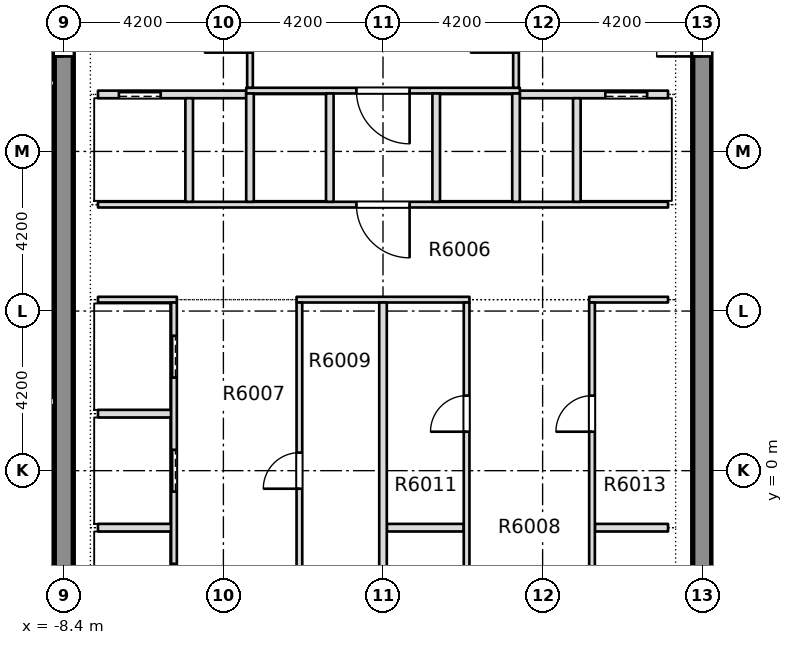
"""IFC4 building model, lengths in metres.
Left out: names, types, materials, properties, quantities, classifications, styles, units other than length and angle.
Written with IfcOpenShell. Run it as: python <this file> out.ifc"""

import sys

from ifc_helpers import new_model, si_unit, direction, frame, frame_2d, origin, place, context, subcontext, project, spatial, rectangle, extrude, element, fill, save


model = new_model("IFC4")
c1 = context("Model", 3, precision=1e-05, world=origin(), true_north=direction((0.0, 1.0)))
c2 = subcontext(c1, "Body", "Model", "MODEL_VIEW")
j1 = project(units=[si_unit("LENGTHUNIT", "METRE"), si_unit("PLANEANGLEUNIT", "RADIAN")], contexts=[c1])
p1 = place(None, origin())
s1 = spatial("IfcSite", under=j1, at=p1, CompositionType="ELEMENT")
p2 = place(p1, origin())
s2 = spatial("IfcBuilding", under=s1, at=p2, CompositionType="ELEMENT")
p3 = place(p2, frame((0.0, 0.0, 230.35)))
s3 = spatial("IfcBuildingStorey", under=s2, at=p3, CompositionType="ELEMENT", Elevation=230.35)
p4 = place(p3, frame((-8.4, -7.9, -0.4), z_axis=(0.0, 0.0, 1.0), x_axis=(0.0, 1.0, 0.0)))
e1 = element("IfcWall", 1, at=p4, inside=s3, PredefinedType="SHEAR", context=c2, shape_type="SweptSolid", body=[
    extrude(rectangle(XDim=29.15, YDim=0.5, at=frame_2d((14.575, 0.0))), origin(), (0.0, 0.0, 1.0), 3.45),
])
p5 = place(p4, frame((18.8, 0.0, 0.4)))
e2 = element("IfcOpeningElement", 2, at=p5, cuts=e1, PredefinedType="OPENING", context=c2, shape_type="SweptSolid", body=[
    extrude(rectangle(XDim=1.2, YDim=2.1, at=frame_2d((0.6, 1.05))), frame((0.0, 0.26, 0.0), z_axis=(0.0, -1.0, 0.0), x_axis=(1.0, 0.0, 0.0)), (0.0, 0.0, 1.0), 0.52),
])
p6 = place(p3, frame((8.4, -7.9, -0.4), z_axis=(0.0, 0.0, 1.0), x_axis=(0.0, 1.0, 0.0)))
e3 = element("IfcWall", 3, at=p6, inside=s3, PredefinedType="SHEAR", context=c2, shape_type="SweptSolid", body=[
    extrude(rectangle(XDim=29.15, YDim=0.5, at=frame_2d((14.575, 0.0))), origin(), (0.0, 0.0, 1.0), 3.45),
])
p7 = place(p6, frame((18.8, 0.0, 0.4)))
e4 = element("IfcOpeningElement", 4, at=p7, cuts=e3, PredefinedType="OPENING", context=c2, shape_type="SweptSolid", body=[
    extrude(rectangle(XDim=1.2, YDim=2.1, at=frame_2d((0.6, 1.05))), frame((0.0, 0.26, 0.0), z_axis=(0.0, -1.0, 0.0), x_axis=(1.0, 0.0, 0.0)), (0.0, 0.0, 1.0), 0.52),
])
p8 = place(p3, frame((-7.5, -1.5, 0.0), z_axis=(0.0, 0.0, 1.0), x_axis=(1.0, 0.0, 0.0)))
e5 = element("IfcWall", 5, at=p8, inside=s3, PredefinedType="PARTITIONING", context=c2, shape_type="SweptSolid", body=[
    extrude(rectangle(XDim=1.925, YDim=0.2, at=frame_2d((0.962, 0.0))), origin(), (0.0, 0.0, 1.0), 3.05),
])
p9 = place(p3, frame((0.1, -1.5, 0.0), z_axis=(0.0, 0.0, 1.0), x_axis=(1.0, 0.0, 0.0)))
e6 = element("IfcWall", 6, at=p9, inside=s3, PredefinedType="PARTITIONING", context=c2, shape_type="SweptSolid", body=[
    extrude(rectangle(XDim=2.025, YDim=0.2, at=frame_2d((1.012, 0.0))), origin(), (0.0, 0.0, 1.0), 3.05),
])
for number, where, z_axis, x_axis in (
    (7, (5.575, -1.5, 0.0), (0.0, 0.0, 1.0), (1.0, 0.0, 0.0)),
    (8, (-7.5, 1.5, 0.0), (0.0, 0.0, 1.0), (1.0, 0.0, 0.0)),
):
    element("IfcWall", number, at=place(p3, frame(where, z_axis=z_axis, x_axis=x_axis)), inside=s3, PredefinedType="PARTITIONING", context=c2, shape_type="SweptSolid", body=[
        extrude(rectangle(XDim=1.925, YDim=0.2, at=frame_2d((0.962, 0.0))), origin(), (0.0, 0.0, 1.0), 3.05),
    ])
p10 = place(p3, frame((-7.5, 4.5, 0.0), z_axis=(0.0, 0.0, 1.0), x_axis=(1.0, 0.0, 0.0)))
e9 = element("IfcWall", 9, at=p10, inside=s3, PredefinedType="PARTITIONING", context=c2, shape_type="SweptSolid", body=[
    extrude(rectangle(XDim=2.075, YDim=0.15, at=frame_2d((1.038, 0.0))), origin(), (0.0, 0.0, 1.0), 3.05),
])
p11 = place(p3, frame((-2.275, 4.5, 0.0), z_axis=(0.0, 0.0, 1.0), x_axis=(1.0, 0.0, 0.0)))
e10 = element("IfcWall", 10, at=p11, inside=s3, PredefinedType="PARTITIONING", context=c2, shape_type="SweptSolid", body=[
    extrude(rectangle(XDim=4.55, YDim=0.15, at=frame_2d((2.275, 0.0))), origin(), (0.0, 0.0, 1.0), 3.05),
])
p12 = place(p3, frame((5.425, 4.5, 0.0), z_axis=(0.0, 0.0, 1.0), x_axis=(1.0, 0.0, 0.0)))
e11 = element("IfcWall", 11, at=p12, inside=s3, PredefinedType="PARTITIONING", context=c2, shape_type="SweptSolid", body=[
    extrude(rectangle(XDim=2.075, YDim=0.15, at=frame_2d((1.038, 0.0))), origin(), (0.0, 0.0, 1.0), 3.05),
])
p13 = place(p3, frame((-7.5, 7.0, 0.0), z_axis=(0.0, 0.0, 1.0), x_axis=(1.0, 0.0, 0.0)))
e12 = element("IfcWall", 12, at=p13, inside=s3, PredefinedType="PARTITIONING", context=c2, shape_type="SweptSolid", body=[
    extrude(rectangle(XDim=15.0, YDim=0.15, at=frame_2d((7.5, 0.0))), origin(), (0.0, 0.0, 1.0), 3.05),
])
p14 = place(p13, frame((6.8, 0.0, 0.0)))
e13 = element("IfcOpeningElement", 13, at=p14, cuts=e12, PredefinedType="OPENING", context=c2, shape_type="SweptSolid", body=[
    extrude(rectangle(XDim=1.4, YDim=2.1, at=frame_2d((0.7, 1.05))), frame((0.0, 0.085, 0.0), z_axis=(0.0, -1.0, 0.0), x_axis=(1.0, 0.0, 0.0)), (0.0, 0.0, 1.0), 0.17),
])
p15 = place(p3, frame((-7.5, 9.9, 0.0), z_axis=(0.0, 0.0, 1.0), x_axis=(1.0, 0.0, 0.0)))
e14 = element("IfcWall", 14, at=p15, inside=s3, PredefinedType="PARTITIONING", context=c2, shape_type="SweptSolid", body=[
    extrude(rectangle(XDim=3.9, YDim=0.2, at=frame_2d((1.95, 0.0))), origin(), (0.0, 0.0, 1.0), 3.05),
])
p16 = place(p15, frame((0.55, 0.0, 0.0)))
e15 = element("IfcOpeningElement", 15, at=p16, cuts=e14, PredefinedType="OPENING", context=c2, shape_type="SweptSolid", body=[
    extrude(rectangle(XDim=1.1, YDim=2.1, at=frame_2d((0.55, 1.05))), frame((0.0, 0.11, 0.0), z_axis=(0.0, -1.0, 0.0), x_axis=(1.0, 0.0, 0.0)), (0.0, 0.0, 1.0), 0.22),
])
p17 = place(p3, frame((3.6, 9.9, 0.0), z_axis=(0.0, 0.0, 1.0), x_axis=(1.0, 0.0, 0.0)))
e16 = element("IfcWall", 16, at=p17, inside=s3, PredefinedType="PARTITIONING", context=c2, shape_type="SweptSolid", body=[
    extrude(rectangle(XDim=3.9, YDim=0.2, at=frame_2d((1.95, 0.0))), origin(), (0.0, 0.0, 1.0), 3.05),
])
p18 = place(p17, frame((2.25, 0.0, 0.0)))
e17 = element("IfcOpeningElement", 17, at=p18, cuts=e16, PredefinedType="OPENING", context=c2, shape_type="SweptSolid", body=[
    extrude(rectangle(XDim=1.1, YDim=2.1, at=frame_2d((0.55, 1.05))), frame((0.0, 0.11, 0.0), z_axis=(0.0, -1.0, 0.0), x_axis=(1.0, 0.0, 0.0)), (0.0, 0.0, 1.0), 0.22),
])
p19 = place(p3, frame((-3.6, 10.0, 0.0), z_axis=(0.0, 0.0, 1.0), x_axis=(1.0, 0.0, 0.0)))
e18 = element("IfcWall", 18, at=p19, inside=s3, PredefinedType="PARTITIONING", context=c2, shape_type="SweptSolid", body=[
    extrude(rectangle(XDim=7.2, YDim=0.15, at=frame_2d((3.6, 0.0))), origin(), (0.0, 0.0, 1.0), 3.05),
])
p20 = place(p19, frame((2.9, 0.0, 0.0)))
e19 = element("IfcOpeningElement", 19, at=p20, cuts=e18, PredefinedType="OPENING", context=c2, shape_type="SweptSolid", body=[
    extrude(rectangle(XDim=1.4, YDim=2.1, at=frame_2d((0.7, 1.05))), frame((0.0, 0.085, 0.0), z_axis=(0.0, -1.0, 0.0), x_axis=(1.0, 0.0, 0.0)), (0.0, 0.0, 1.0), 0.17),
])
p21 = place(p3, frame((-5.5, -7.899, 0.0), z_axis=(0.0, 0.0, 1.0), x_axis=(0.0, 1.0, 0.0)))
e20 = element("IfcWall", 20, at=p21, inside=s3, PredefinedType="PARTITIONING", context=c2, shape_type="SweptSolid", body=[
    extrude(rectangle(XDim=12.324, YDim=0.15, at=frame_2d((6.162, 0.0))), origin(), (0.0, 0.0, 1.0), 3.05),
])
p22 = place(p21, frame((1.349, 0.0, 0.0)))
e21 = element("IfcOpeningElement", 21, at=p22, cuts=e20, PredefinedType="OPENING", context=c2, shape_type="SweptSolid", body=[
    extrude(rectangle(XDim=1.1, YDim=2.1, at=frame_2d((0.55, 1.05))), frame((0.0, 0.085, 0.0), z_axis=(0.0, -1.0, 0.0), x_axis=(1.0, 0.0, 0.0)), (0.0, 0.0, 1.0), 0.17),
])
p23 = place(p21, frame((4.349, 0.0, 0.0)))
e22 = element("IfcOpeningElement", 22, at=p23, cuts=e20, PredefinedType="OPENING", context=c2, shape_type="SweptSolid", body=[
    extrude(rectangle(XDim=1.1, YDim=2.1, at=frame_2d((0.55, 1.05))), frame((0.0, 0.085, 0.0), z_axis=(0.0, -1.0, 0.0), x_axis=(1.0, 0.0, 0.0)), (0.0, 0.0, 1.0), 0.17),
])
p24 = place(p21, frame((7.349, 0.0, 0.0)))
e23 = element("IfcOpeningElement", 23, at=p24, cuts=e20, PredefinedType="OPENING", context=c2, shape_type="SweptSolid", body=[
    extrude(rectangle(XDim=1.1, YDim=2.1, at=frame_2d((0.55, 1.05))), frame((0.0, 0.085, 0.0), z_axis=(0.0, -1.0, 0.0), x_axis=(1.0, 0.0, 0.0)), (0.0, 0.0, 1.0), 0.17),
])
p25 = place(p21, frame((10.349, 0.0, 0.0)))
e24 = element("IfcOpeningElement", 24, at=p25, cuts=e20, PredefinedType="OPENING", context=c2, shape_type="SweptSolid", body=[
    extrude(rectangle(XDim=1.1, YDim=2.1, at=frame_2d((0.55, 1.05))), frame((0.0, 0.085, 0.0), z_axis=(0.0, -1.0, 0.0), x_axis=(1.0, 0.0, 0.0)), (0.0, 0.0, 1.0), 0.17),
])
p26 = place(p3, frame((-5.1, 7.075, 0.0), z_axis=(0.0, 0.0, 1.0), x_axis=(0.0, 1.0, 0.0)))
e25 = element("IfcWall", 25, at=p26, inside=s3, PredefinedType="PARTITIONING", context=c2, shape_type="SweptSolid", body=[
    extrude(rectangle(XDim=2.725, YDim=0.2, at=frame_2d((1.363, 0.0))), origin(), (0.0, 0.0, 1.0), 3.05),
])
p27 = place(p3, frame((-3.5, 7.075, 0.0), z_axis=(0.0, 0.0, 1.0), x_axis=(0.0, 1.0, 0.0)))
e26 = element("IfcWall", 26, at=p27, inside=s3, PredefinedType="PARTITIONING", context=c2, shape_type="SweptSolid", body=[
    extrude(rectangle(XDim=2.85, YDim=0.2, at=frame_2d((1.425, 0.0))), origin(), (0.0, 0.0, 1.0), 3.05),
])
p28 = place(p3, frame((-3.5, 10.075, 0.0), z_axis=(0.0, 0.0, 1.0), x_axis=(0.0, 1.0, 0.0)))
e27 = element("IfcWall", 27, at=p28, inside=s3, PredefinedType="PARTITIONING", context=c2, shape_type="SweptSolid", body=[
    extrude(rectangle(XDim=3.075, YDim=0.15, at=frame_2d((1.538, 0.0))), origin(), (0.0, 0.0, 1.0), 3.05),
])
p29 = place(p28, frame((0.925, 0.0, 0.0)))
e28 = element("IfcOpeningElement", 28, at=p29, cuts=e27, PredefinedType="OPENING", context=c2, shape_type="SweptSolid", body=[
    extrude(rectangle(XDim=1.2, YDim=2.1, at=frame_2d((0.6, 1.05))), frame((0.0, 0.085, 0.0), z_axis=(0.0, -1.0, 0.0), x_axis=(1.0, 0.0, 0.0)), (0.0, 0.0, 1.0), 0.17),
])
p30 = place(p3, frame((-2.2, -7.899, 0.0), z_axis=(0.0, 0.0, 1.0), x_axis=(0.0, 1.0, 0.0)))
e29 = element("IfcWall", 29, at=p30, inside=s3, PredefinedType="PARTITIONING", context=c2, shape_type="SweptSolid", body=[
    extrude(rectangle(XDim=12.324, YDim=0.15, at=frame_2d((6.162, 0.0))), origin(), (0.0, 0.0, 1.0), 3.05),
])
p31 = place(p30, frame((1.349, 0.0, 0.0)))
e30 = element("IfcOpeningElement", 30, at=p31, cuts=e29, PredefinedType="OPENING", context=c2, shape_type="SweptSolid", body=[
    extrude(rectangle(XDim=1.1, YDim=2.1, at=frame_2d((0.55, 1.05))), frame((0.0, 0.085, 0.0), z_axis=(0.0, -1.0, 0.0), x_axis=(1.0, 0.0, 0.0)), (0.0, 0.0, 1.0), 0.17),
])
p32 = place(p30, frame((7.424, 0.0, 0.0)))
e31 = element("IfcOpeningElement", 31, at=p32, cuts=e29, PredefinedType="OPENING", context=c2, shape_type="SweptSolid", body=[
    extrude(rectangle(XDim=0.95, YDim=2.1, at=frame_2d((0.475, 1.05))), frame((0.0, 0.085, 0.0), z_axis=(0.0, -1.0, 0.0), x_axis=(1.0, 0.0, 0.0)), (0.0, 0.0, 1.0), 0.17),
])
p33 = place(p3, frame((-1.4, 7.075, 0.0), z_axis=(0.0, 0.0, 1.0), x_axis=(0.0, 1.0, 0.0)))
e32 = element("IfcWall", 32, at=p33, inside=s3, PredefinedType="PARTITIONING", context=c2, shape_type="SweptSolid", body=[
    extrude(rectangle(XDim=2.85, YDim=0.2, at=frame_2d((1.425, 0.0))), origin(), (0.0, 0.0, 1.0), 3.05),
])
p34 = place(p3, frame((0.0, -7.899, 0.0), z_axis=(0.0, 0.0, 1.0), x_axis=(0.0, 1.0, 0.0)))
e33 = element("IfcWall", 33, at=p34, inside=s3, PredefinedType="PARTITIONING", context=c2, shape_type="SweptSolid", body=[
    extrude(rectangle(XDim=12.324, YDim=0.2, at=frame_2d((6.162, 0.0))), origin(), (0.0, 0.0, 1.0), 3.05),
])
p35 = place(p3, frame((1.4, 7.075, 0.0), z_axis=(0.0, 0.0, 1.0), x_axis=(0.0, 1.0, 0.0)))
e34 = element("IfcWall", 34, at=p35, inside=s3, PredefinedType="PARTITIONING", context=c2, shape_type="SweptSolid", body=[
    extrude(rectangle(XDim=2.85, YDim=0.2, at=frame_2d((1.425, 0.0))), origin(), (0.0, 0.0, 1.0), 3.05),
])
p36 = place(p3, frame((2.2, -7.899, 0.0), z_axis=(0.0, 0.0, 1.0), x_axis=(0.0, 1.0, 0.0)))
e35 = element("IfcWall", 35, at=p36, inside=s3, PredefinedType="PARTITIONING", context=c2, shape_type="SweptSolid", body=[
    extrude(rectangle(XDim=12.324, YDim=0.15, at=frame_2d((6.162, 0.0))), origin(), (0.0, 0.0, 1.0), 3.05),
])
p37 = place(p36, frame((2.924, 0.0, 0.0)))
e36 = element("IfcOpeningElement", 36, at=p37, cuts=e35, PredefinedType="OPENING", context=c2, shape_type="SweptSolid", body=[
    extrude(rectangle(XDim=0.95, YDim=2.1, at=frame_2d((0.475, 1.05))), frame((0.0, 0.085, 0.0), z_axis=(0.0, -1.0, 0.0), x_axis=(1.0, 0.0, 0.0)), (0.0, 0.0, 1.0), 0.17),
])
p38 = place(p36, frame((8.924, 0.0, 0.0)))
e37 = element("IfcOpeningElement", 37, at=p38, cuts=e35, PredefinedType="OPENING", context=c2, shape_type="SweptSolid", body=[
    extrude(rectangle(XDim=0.95, YDim=2.1, at=frame_2d((0.475, 1.05))), frame((0.0, 0.085, 0.0), z_axis=(0.0, -1.0, 0.0), x_axis=(1.0, 0.0, 0.0)), (0.0, 0.0, 1.0), 0.17),
])
p39 = place(p3, frame((3.5, 7.075, 0.0), z_axis=(0.0, 0.0, 1.0), x_axis=(0.0, 1.0, 0.0)))
e38 = element("IfcWall", 38, at=p39, inside=s3, PredefinedType="PARTITIONING", context=c2, shape_type="SweptSolid", body=[
    extrude(rectangle(XDim=2.85, YDim=0.2, at=frame_2d((1.425, 0.0))), origin(), (0.0, 0.0, 1.0), 3.05),
])
p40 = place(p3, frame((3.5, 10.075, 0.0), z_axis=(0.0, 0.0, 1.0), x_axis=(0.0, 1.0, 0.0)))
e39 = element("IfcWall", 39, at=p40, inside=s3, PredefinedType="PARTITIONING", context=c2, shape_type="SweptSolid", body=[
    extrude(rectangle(XDim=3.075, YDim=0.15, at=frame_2d((1.538, 0.0))), origin(), (0.0, 0.0, 1.0), 3.05),
])
p41 = place(p40, frame((0.925, 0.0, 0.0)))
e40 = element("IfcOpeningElement", 40, at=p41, cuts=e39, PredefinedType="OPENING", context=c2, shape_type="SweptSolid", body=[
    extrude(rectangle(XDim=1.2, YDim=2.1, at=frame_2d((0.6, 1.05))), frame((0.0, 0.085, 0.0), z_axis=(0.0, -1.0, 0.0), x_axis=(1.0, 0.0, 0.0)), (0.0, 0.0, 1.0), 0.17),
])
p42 = place(p3, frame((5.1, 7.075, 0.0), z_axis=(0.0, 0.0, 1.0), x_axis=(0.0, 1.0, 0.0)))
e41 = element("IfcWall", 41, at=p42, inside=s3, PredefinedType="PARTITIONING", context=c2, shape_type="SweptSolid", body=[
    extrude(rectangle(XDim=2.725, YDim=0.2, at=frame_2d((1.363, 0.0))), origin(), (0.0, 0.0, 1.0), 3.05),
])
p43 = place(p3, frame((5.5, -7.899, 0.0), z_axis=(0.0, 0.0, 1.0), x_axis=(0.0, 1.0, 0.0)))
e42 = element("IfcWall", 42, at=p43, inside=s3, PredefinedType="PARTITIONING", context=c2, shape_type="SweptSolid", body=[
    extrude(rectangle(XDim=12.324, YDim=0.15, at=frame_2d((6.162, 0.0))), origin(), (0.0, 0.0, 1.0), 3.05),
])
p44 = place(p43, frame((2.924, 0.0, 0.0)))
e43 = element("IfcOpeningElement", 43, at=p44, cuts=e42, PredefinedType="OPENING", context=c2, shape_type="SweptSolid", body=[
    extrude(rectangle(XDim=0.95, YDim=2.1, at=frame_2d((0.475, 1.05))), frame((0.0, 0.085, 0.0), z_axis=(0.0, -1.0, 0.0), x_axis=(1.0, 0.0, 0.0)), (0.0, 0.0, 1.0), 0.17),
])
p45 = place(p43, frame((8.924, 0.0, 0.0)))
e44 = element("IfcOpeningElement", 44, at=p45, cuts=e42, PredefinedType="OPENING", context=c2, shape_type="SweptSolid", body=[
    extrude(rectangle(XDim=0.95, YDim=2.1, at=frame_2d((0.475, 1.05))), frame((0.0, 0.085, 0.0), z_axis=(0.0, -1.0, 0.0), x_axis=(1.0, 0.0, 0.0)), (0.0, 0.0, 1.0), 0.17),
])
p46 = place(p3, frame((-12.099, 1.816, 0.0), z_axis=(0.0, 0.0, 1.0), x_axis=(1.0, 0.0, 0.0)))
e45 = element("IfcWall", 45, at=p46, inside=s3, PredefinedType="PARTITIONING", context=c2, shape_type="SweptSolid", body=[
    extrude(rectangle(XDim=3.448, YDim=0.2, at=frame_2d((1.724, 0.0))), origin(), (0.0, 0.0, 1.0), 3.05),
])
p47 = place(p3, frame((-12.099, 10.2, 0.0), z_axis=(0.0, 0.0, 1.0), x_axis=(1.0, 0.0, 0.0)))
e46 = element("IfcWall", 46, at=p47, inside=s3, PredefinedType="PARTITIONING", context=c2, shape_type="SweptSolid", body=[
    extrude(rectangle(XDim=3.448, YDim=0.15, at=frame_2d((1.724, 0.0))), origin(), (0.0, 0.0, 1.0), 3.05),
])
for number, where, z_axis, x_axis in (
    (47, (8.651, -0.125, 0.0), (0.0, 0.0, 1.0), (1.0, 0.0, 0.0)),
    (48, (8.651, 4.054, 0.0), (0.0, 0.0, 1.0), (1.0, 0.0, 0.0)),
):
    element("IfcWall", number, at=place(p3, frame(where, z_axis=z_axis, x_axis=x_axis)), inside=s3, PredefinedType="PARTITIONING", context=c2, shape_type="SweptSolid", body=[
        extrude(rectangle(XDim=3.448, YDim=0.1, at=frame_2d((1.724, 0.0))), origin(), (0.0, 0.0, 1.0), 3.05),
    ])
p48 = place(p3, frame((8.651, 10.2, 0.0), z_axis=(0.0, 0.0, 1.0), x_axis=(1.0, 0.0, 0.0)))
e49 = element("IfcWall", 49, at=p48, inside=s3, PredefinedType="PARTITIONING", context=c2, shape_type="SweptSolid", body=[
    extrude(rectangle(XDim=3.448, YDim=0.15, at=frame_2d((1.724, 0.0))), origin(), (0.0, 0.0, 1.0), 3.05),
])
p49 = place(p23, origin())
e50 = element("IfcDoor", 50, at=p49, inside=s3, OperationType="SLIDING_TO_LEFT", PredefinedType="DOOR", context=c2, shape_type="SweptSolid", body=[
    extrude(rectangle(XDim=1.1, YDim=2.1, at=frame_2d((0.55, 1.05))), frame((0.0, 0.025, 0.0), z_axis=(0.0, -1.0, 0.0), x_axis=(1.0, 0.0, 0.0)), (0.0, 0.0, 1.0), 0.05),
])
fill(e22, e50)
p50 = place(p24, origin())
e51 = element("IfcDoor", 51, at=p50, inside=s3, OperationType="SLIDING_TO_LEFT", PredefinedType="DOOR", context=c2, shape_type="SweptSolid", body=[
    extrude(rectangle(XDim=1.1, YDim=2.1, at=frame_2d((0.55, 1.05))), frame((0.0, 0.025, 0.0), z_axis=(0.0, -1.0, 0.0), x_axis=(1.0, 0.0, 0.0)), (0.0, 0.0, 1.0), 0.05),
])
fill(e23, e51)
p51 = place(p25, origin())
e52 = element("IfcDoor", 52, at=p51, inside=s3, OperationType="SLIDING_TO_LEFT", PredefinedType="DOOR", context=c2, shape_type="SweptSolid", body=[
    extrude(rectangle(XDim=1.1, YDim=2.1, at=frame_2d((0.55, 1.05))), frame((0.0, 0.025, 0.0), z_axis=(0.0, -1.0, 0.0), x_axis=(1.0, 0.0, 0.0)), (0.0, 0.0, 1.0), 0.05),
])
fill(e24, e52)
p52 = place(p32, origin())
e53 = element("IfcDoor", 53, at=p52, inside=s3, OperationType="SINGLE_SWING_RIGHT", PredefinedType="DOOR", context=c2, shape_type="SweptSolid", body=[
    extrude(rectangle(XDim=0.95, YDim=2.1, at=frame_2d((0.475, 1.05))), frame((0.0, 0.025, 0.0), z_axis=(0.0, -1.0, 0.0), x_axis=(1.0, 0.0, 0.0)), (0.0, 0.0, 1.0), 0.05),
])
fill(e31, e53)
p53 = place(p38, origin())
e54 = element("IfcDoor", 54, at=p53, inside=s3, OperationType="SINGLE_SWING_RIGHT", PredefinedType="DOOR", context=c2, shape_type="SweptSolid", body=[
    extrude(rectangle(XDim=0.95, YDim=2.1, at=frame_2d((0.475, 1.05))), frame((0.0, 0.025, 0.0), z_axis=(0.0, -1.0, 0.0), x_axis=(1.0, 0.0, 0.0)), (0.0, 0.0, 1.0), 0.05),
])
fill(e37, e54)
p54 = place(p45, origin())
e55 = element("IfcDoor", 55, at=p54, inside=s3, OperationType="SINGLE_SWING_LEFT", PredefinedType="DOOR", context=c2, shape_type="SweptSolid", body=[
    extrude(rectangle(XDim=0.95, YDim=2.1, at=frame_2d((0.475, 1.05))), frame((0.0, 0.025, 0.0), z_axis=(0.0, -1.0, 0.0), x_axis=(1.0, 0.0, 0.0)), (0.0, 0.0, 1.0), 0.05),
])
fill(e44, e55)
p55 = place(p16, origin())
e56 = element("IfcDoor", 56, at=p55, inside=s3, OperationType="SLIDING_TO_RIGHT", PredefinedType="DOOR", context=c2, shape_type="SweptSolid", body=[
    extrude(rectangle(XDim=1.1, YDim=2.1, at=frame_2d((0.55, 1.05))), frame((0.0, 0.025, 0.0), z_axis=(0.0, -1.0, 0.0), x_axis=(1.0, 0.0, 0.0)), (0.0, 0.0, 1.0), 0.05),
])
fill(e15, e56)
p56 = place(p18, origin())
e57 = element("IfcDoor", 57, at=p56, inside=s3, OperationType="SLIDING_TO_LEFT", PredefinedType="DOOR", context=c2, shape_type="SweptSolid", body=[
    extrude(rectangle(XDim=1.1, YDim=2.1, at=frame_2d((0.55, 1.05))), frame((0.0, 0.025, 0.0), z_axis=(0.0, -1.0, 0.0), x_axis=(1.0, 0.0, 0.0)), (0.0, 0.0, 1.0), 0.05),
])
fill(e17, e57)
p57 = place(p14, origin())
e58 = element("IfcDoor", 58, at=p57, inside=s3, OperationType="SINGLE_SWING_RIGHT", PredefinedType="DOOR", context=c2, shape_type="SweptSolid", body=[
    extrude(rectangle(XDim=1.4, YDim=2.1, at=frame_2d((0.7, 1.05))), frame((0.0, 0.025, 0.0), z_axis=(0.0, -1.0, 0.0), x_axis=(1.0, 0.0, 0.0)), (0.0, 0.0, 1.0), 0.05),
])
fill(e13, e58)
p58 = place(p20, origin())
e59 = element("IfcDoor", 59, at=p58, inside=s3, OperationType="SINGLE_SWING_RIGHT", PredefinedType="DOOR", context=c2, shape_type="SweptSolid", body=[
    extrude(rectangle(XDim=1.4, YDim=2.1, at=frame_2d((0.7, 1.05))), frame((0.0, 0.025, 0.0), z_axis=(0.0, -1.0, 0.0), x_axis=(1.0, 0.0, 0.0)), (0.0, 0.0, 1.0), 0.05),
])
fill(e19, e59)
p59 = place(p5, origin())
e60 = element("IfcDoor", 60, at=p59, inside=s3, OperationType="SINGLE_SWING_LEFT", PredefinedType="DOOR", context=c2, shape_type="SweptSolid", body=[
    extrude(rectangle(XDim=1.2, YDim=2.1, at=frame_2d((0.6, 1.05))), frame((0.0, 0.025, 0.0), z_axis=(0.0, -1.0, 0.0), x_axis=(1.0, 0.0, 0.0)), (0.0, 0.0, 1.0), 0.05),
])
fill(e2, e60)
p60 = place(p7, origin())
e61 = element("IfcDoor", 61, at=p60, inside=s3, OperationType="SINGLE_SWING_LEFT", PredefinedType="DOOR", context=c2, shape_type="SweptSolid", body=[
    extrude(rectangle(XDim=1.2, YDim=2.1, at=frame_2d((0.6, 1.05))), frame((0.0, 0.025, 0.0), z_axis=(0.0, -1.0, 0.0), x_axis=(1.0, 0.0, 0.0)), (0.0, 0.0, 1.0), 0.05),
])
fill(e4, e61)
save(model, sys.argv[1])
